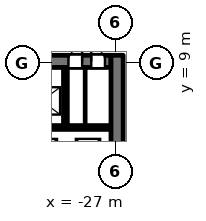
"""IFC4 building model, lengths in metres.
Left out: names, types, materials, properties, quantities, classifications, styles, units other than length and angle.
Written with IfcOpenShell. Run it as: python <this file> out.ifc"""

import sys

from ifc_helpers import new_model, si_unit, direction, frame, frame_2d, origin, place, context, subcontext, project, spatial, rectangle, extrude, element, fill, save


model = new_model("IFC4")
c1 = context("Model", 3, precision=1e-05, world=origin(), true_north=direction((0.0, 1.0)))
c2 = subcontext(c1, "Body", "Model", "MODEL_VIEW")
j1 = project(units=[si_unit("LENGTHUNIT", "METRE"), si_unit("PLANEANGLEUNIT", "RADIAN")], contexts=[c1])
p1 = place(None, origin())
s1 = spatial("IfcSite", under=j1, at=p1, CompositionType="ELEMENT")
p2 = place(p1, origin())
s2 = spatial("IfcBuilding", under=s1, at=p2, CompositionType="ELEMENT")
p3 = place(p2, origin())
s3 = spatial("IfcBuildingStorey", under=s2, at=p3, CompositionType="ELEMENT", Elevation=0.0)
p4 = place(p3, frame((-44.7, 4.75, 0.0), z_axis=(0.0, 0.0, 1.0), x_axis=(1.0, 0.0, 0.0)))
e1 = element("IfcWall", 1, at=p4, inside=s3, PredefinedType="SHEAR", context=c2, shape_type="SweptSolid", body=[
    extrude(rectangle(XDim=17.4, YDim=0.25, at=frame_2d((8.7, 0.0))), origin(), (0.0, 0.0, 1.0), 6.9),
])
p5 = place(p3, frame((-44.7, 9.1, 0.0), z_axis=(0.0, 0.0, 1.0), x_axis=(1.0, 0.0, 0.0)))
e2 = element("IfcWall", 2, at=p5, inside=s3, PredefinedType="SHEAR", context=c2, shape_type="SweptSolid", body=[
    extrude(rectangle(XDim=17.4, YDim=0.8, at=frame_2d((8.7, 0.0))), origin(), (0.0, 0.0, 1.0), 6.9),
])
p6 = place(p5, frame((8.9, 0.0, 0.0)))
e3 = element("IfcOpeningElement", 3, at=p6, cuts=e2, PredefinedType="OPENING", context=c2, shape_type="SweptSolid", body=[
    extrude(rectangle(XDim=1.2, YDim=2.1, at=frame_2d((0.6, 1.05))), frame((0.0, 0.41, 0.0), z_axis=(0.0, -1.0, 0.0), x_axis=(1.0, 0.0, 0.0)), (0.0, 0.0, 1.0), 0.82),
])
p7 = place(p5, frame((14.6, 0.0, 0.0)))
e4 = element("IfcOpeningElement", 4, at=p7, cuts=e2, PredefinedType="OPENING", context=c2, shape_type="SweptSolid", body=[
    extrude(rectangle(XDim=0.9, YDim=2.1, at=frame_2d((0.45, 1.05))), frame((0.0, 0.41, 0.0), z_axis=(0.0, -1.0, 0.0), x_axis=(1.0, 0.0, 0.0)), (0.0, 0.0, 1.0), 0.82),
])
p8 = place(p5, frame((16.1, 0.0, 0.0)))
e5 = element("IfcOpeningElement", 5, at=p8, cuts=e2, PredefinedType="OPENING", context=c2, shape_type="SweptSolid", body=[
    extrude(rectangle(XDim=0.9, YDim=2.1, at=frame_2d((0.45, 1.05))), frame((0.0, 0.41, 0.0), z_axis=(0.0, -1.0, 0.0), x_axis=(1.0, 0.0, 0.0)), (0.0, 0.0, 1.0), 0.82),
])
p9 = place(p3, frame((-30.3, 4.875, 0.0), z_axis=(0.0, 0.0, 1.0), x_axis=(0.0, 1.0, 0.0)))
e6 = element("IfcWall", 6, at=p9, inside=s3, PredefinedType="SHEAR", context=c2, shape_type="SweptSolid", body=[
    extrude(rectangle(XDim=3.825, YDim=0.25, at=frame_2d((1.913, 0.0))), origin(), (0.0, 0.0, 1.0), 6.9),
])
p10 = place(p3, frame((-29.0, 4.875, 0.0), z_axis=(0.0, 0.0, 1.0), x_axis=(0.0, 1.0, 0.0)))
e7 = element("IfcWall", 7, at=p10, inside=s3, PredefinedType="PARTITIONING", context=c2, shape_type="SweptSolid", body=[
    extrude(rectangle(XDim=3.825, YDim=0.15, at=frame_2d((1.913, 0.0))), origin(), (0.0, 0.0, 1.0), 6.9),
])
p11 = place(p3, frame((-26.9, -9.5, 0.0), z_axis=(0.0, 0.0, 1.0), x_axis=(0.0, 1.0, 0.0)))
e8 = element("IfcWall", 8, at=p11, inside=s3, PredefinedType="SHEAR", context=c2, shape_type="SweptSolid", body=[
    extrude(rectangle(XDim=19.0, YDim=0.8, at=frame_2d((9.5, 0.0))), origin(), (0.0, 0.0, 1.0), 6.9),
])
p12 = place(p11, frame((8.3, 0.0, 0.0)))
e9 = element("IfcOpeningElement", 9, at=p12, cuts=e8, PredefinedType="OPENING", context=c2, shape_type="SweptSolid", body=[
    extrude(rectangle(XDim=2.4, YDim=2.1, at=frame_2d((1.2, 1.05))), frame((0.0, 0.41, 0.0), z_axis=(0.0, -1.0, 0.0), x_axis=(1.0, 0.0, 0.0)), (0.0, 0.0, 1.0), 0.82),
])
p13 = place(p7, origin())
e10 = element("IfcDoor", 10, at=p13, inside=s3, OperationType="SINGLE_SWING_RIGHT", PredefinedType="DOOR", context=c2, shape_type="SweptSolid", body=[
    extrude(rectangle(XDim=0.9, YDim=2.1, at=frame_2d((0.45, 1.05))), frame((0.0, -0.225, 0.0), z_axis=(0.0, -1.0, 0.0), x_axis=(1.0, 0.0, 0.0)), (0.0, 0.0, 1.0), 0.05),
])
fill(e4, e10)
p14 = place(p8, origin())
e11 = element("IfcDoor", 11, at=p14, inside=s3, OperationType="SINGLE_SWING_LEFT", PredefinedType="DOOR", context=c2, shape_type="SweptSolid", body=[
    extrude(rectangle(XDim=0.9, YDim=2.1, at=frame_2d((0.45, 1.05))), frame((0.0, -0.225, 0.0), z_axis=(0.0, -1.0, 0.0), x_axis=(1.0, 0.0, 0.0)), (0.0, 0.0, 1.0), 0.05),
])
fill(e5, e11)
save(model, sys.argv[1])
